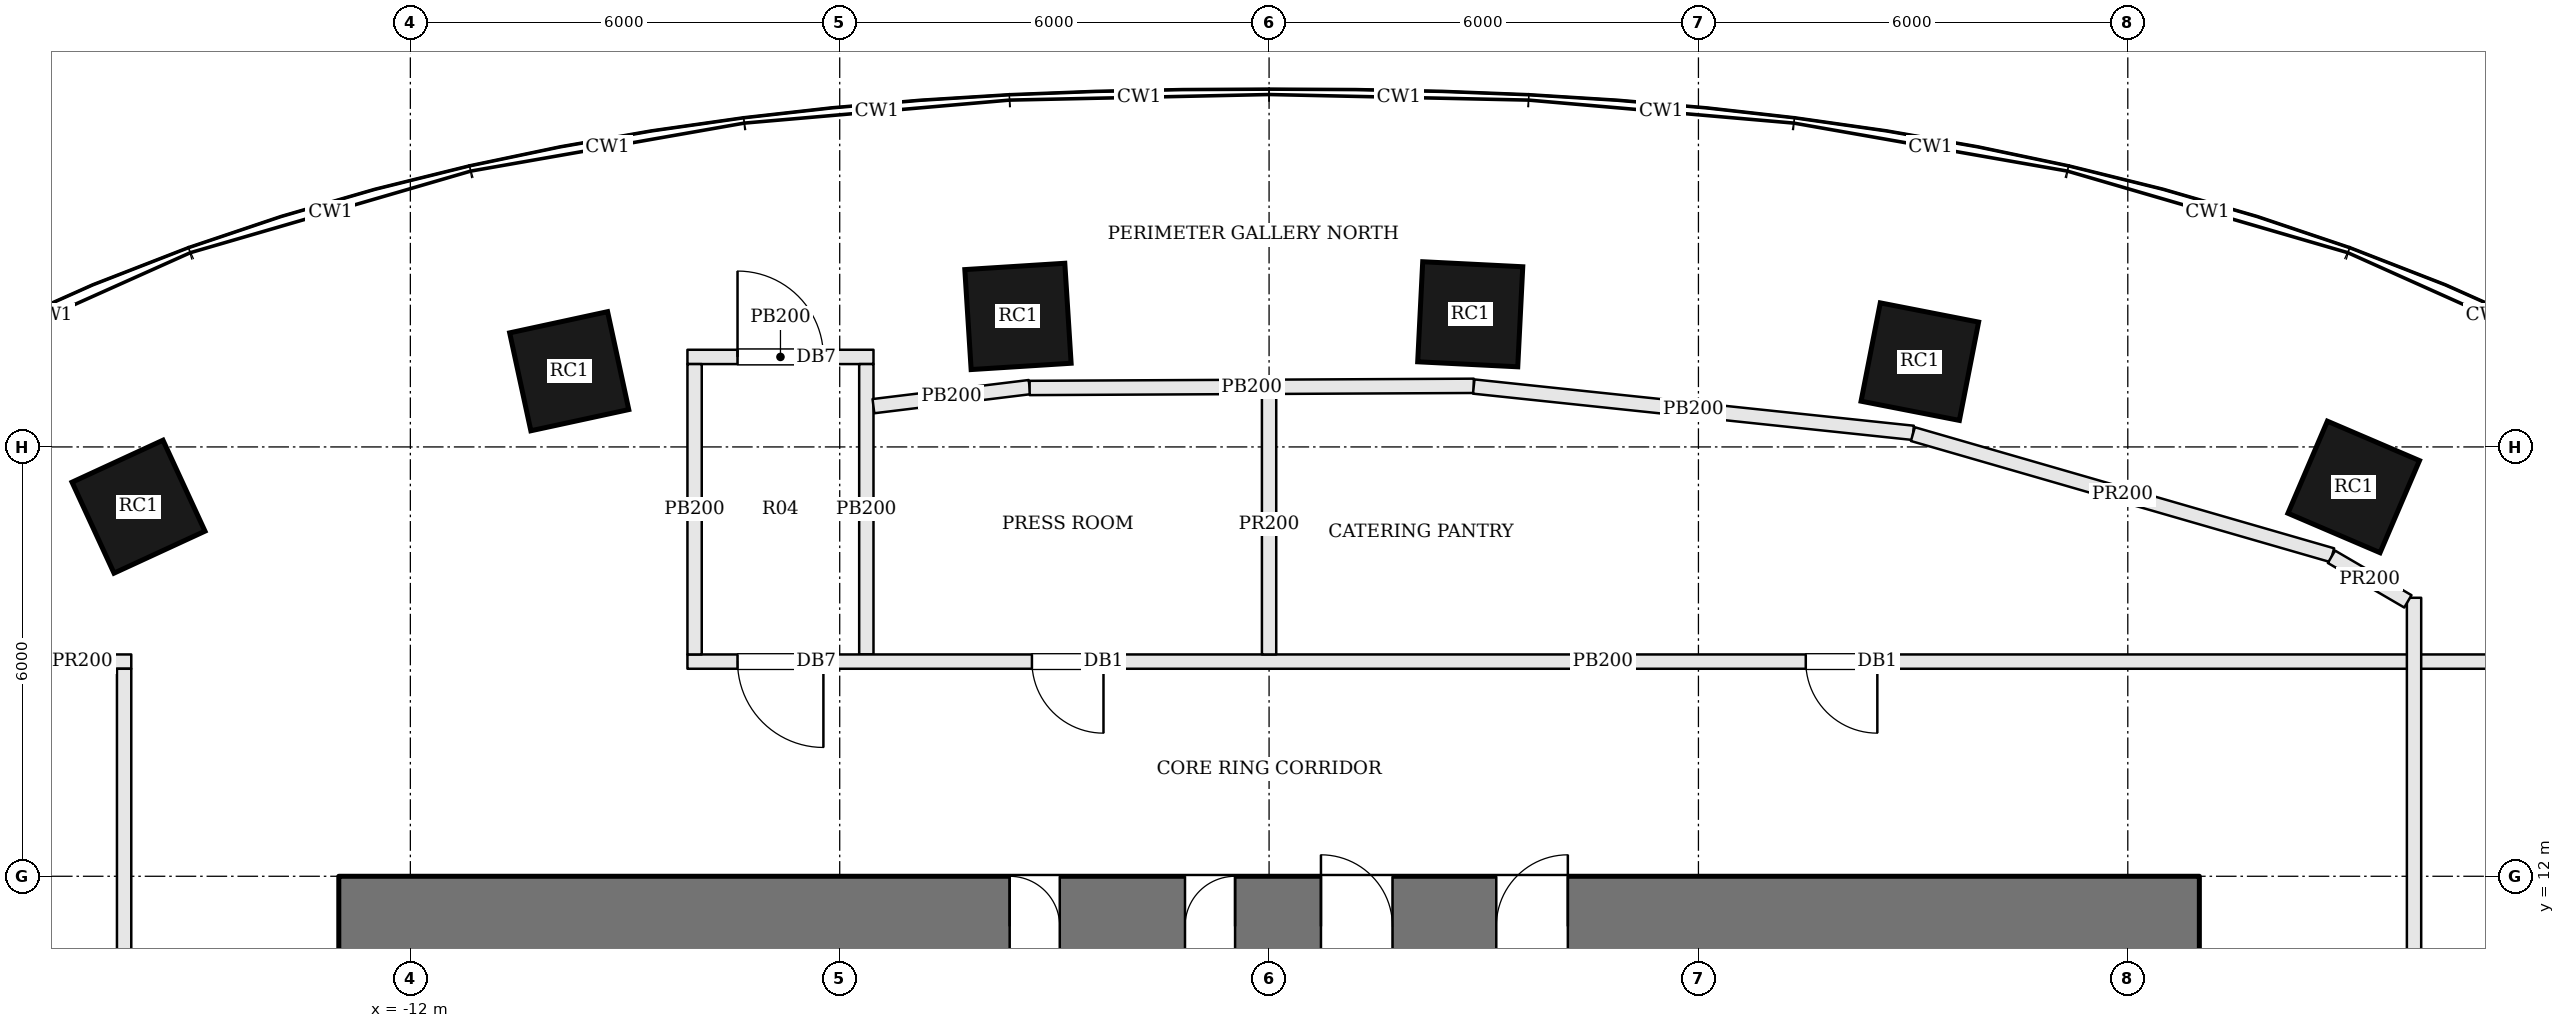
"""IFC4 building model, lengths in metres.
Left out: names, types, materials, properties, quantities, classifications, styles, units other than length and angle.
Written with IfcOpenShell. Run it as: python <this file> out.ifc"""

import sys

from ifc_helpers import new_model, si_unit, direction, frame, frame_2d, origin, origin_2d, place, context, subcontext, project, spatial, rectangle, extrude, element, fill, save


model = new_model("IFC4")
c1 = context("Model", 3, precision=1e-05, world=origin(), true_north=direction((0.0, 1.0)))
c2 = subcontext(c1, "Body", "Model", "MODEL_VIEW")
j1 = project(units=[si_unit("LENGTHUNIT", "METRE"), si_unit("PLANEANGLEUNIT", "RADIAN")], contexts=[c1])
p1 = place(None, origin())
s1 = spatial("IfcSite", under=j1, at=p1, CompositionType="ELEMENT")
p2 = place(p1, origin())
s2 = spatial("IfcBuilding", under=s1, at=p2, CompositionType="ELEMENT")
p3 = place(p2, frame((0.0, 0.0, 7.2)))
s3 = spatial("IfcBuildingStorey", under=s2, at=p3, CompositionType="ELEMENT", Elevation=7.2)
p4 = place(p3, frame((-13.0, 11.3, 0.0), z_axis=(0.0, 0.0, 1.0), x_axis=(1.0, 0.0, 0.0)))
e1 = element("IfcWall", 1, at=p4, inside=s3, PredefinedType="SHEAR", context=c2, shape_type="SweptSolid", body=[
    extrude(rectangle(XDim=26.0, YDim=1.4, at=frame_2d((13.0, 0.0))), origin(), (0.0, 0.0, 1.0), 7.8),
])
p5 = place(p4, frame((9.375, 0.0, 0.0)))
e2 = element("IfcOpeningElement", 2, at=p5, cuts=e1, PredefinedType="OPENING", context=c2, shape_type="SweptSolid", body=[
    extrude(rectangle(XDim=0.7, YDim=2.1, at=frame_2d((0.35, 1.05))), frame((0.0, 0.71, 0.0), z_axis=(0.0, -1.0, 0.0), x_axis=(1.0, 0.0, 0.0)), (0.0, 0.0, 1.0), 1.42),
])
p6 = place(p4, frame((11.825, 0.0, 0.0)))
e3 = element("IfcOpeningElement", 3, at=p6, cuts=e1, PredefinedType="OPENING", context=c2, shape_type="SweptSolid", body=[
    extrude(rectangle(XDim=0.7, YDim=2.1, at=frame_2d((0.35, 1.05))), frame((0.0, 0.71, 0.0), z_axis=(0.0, -1.0, 0.0), x_axis=(1.0, 0.0, 0.0)), (0.0, 0.0, 1.0), 1.42),
])
p7 = place(p4, frame((13.725, 0.0, 0.0)))
e4 = element("IfcOpeningElement", 4, at=p7, cuts=e1, PredefinedType="OPENING", context=c2, shape_type="SweptSolid", body=[
    extrude(rectangle(XDim=1.0, YDim=2.1, at=frame_2d((0.5, 1.05))), frame((0.0, 0.71, 0.0), z_axis=(0.0, -1.0, 0.0), x_axis=(1.0, 0.0, 0.0)), (0.0, 0.0, 1.0), 1.42),
])
p8 = place(p4, frame((16.175, 0.0, 0.0)))
e5 = element("IfcOpeningElement", 5, at=p8, cuts=e1, PredefinedType="OPENING", context=c2, shape_type="SweptSolid", body=[
    extrude(rectangle(XDim=1.0, YDim=2.1, at=frame_2d((0.5, 1.05))), frame((0.0, 0.71, 0.0), z_axis=(0.0, -1.0, 0.0), x_axis=(1.0, 0.0, 0.0)), (0.0, 0.0, 1.0), 1.42),
])
for number, where, z_axis, x_axis in (
    (6, (15.157, 17.441, 0.0), (0.0, 0.0, 1.0), (-0.919, 0.394, 0.0)),
    (7, (9.094, 19.192, 0.0), (0.0, 0.0, 1.0), (-0.981, 0.192, 0.0)),
    (8, (2.811, 19.854, 0.0), (0.0, 0.0, 1.0), (-0.999, 0.05, 0.0)),
    (9, (-3.509, 19.824, 0.0), (0.0, 0.0, 1.0), (-0.998, -0.063, 0.0)),
    (10, (-9.78, 19.058, 0.0), (0.0, 0.0, 1.0), (-0.977, -0.211, 0.0)),
    (11, (-15.799, 17.165, 0.0), (0.0, 0.0, 1.0), (-0.908, -0.419, 0.0)),
):
    element("IfcColumn", number, at=place(p3, frame(where, z_axis=z_axis, x_axis=x_axis)), inside=s3, PredefinedType="COLUMN", context=c2, shape_type="SweptSolid", body=[
        extrude(rectangle(XDim=1.4, YDim=1.4, at=origin_2d()), origin(), (0.0, 0.0, 1.0), 7.8),
    ])
p9 = place(p3, frame((-8.128, 19.258, 0.0), z_axis=(0.0, 0.0, 1.0), x_axis=(1.0, 0.0, 0.0)))
e12 = element("IfcWall", 12, at=p9, inside=s3, PredefinedType="PARTITIONING", context=c2, shape_type="SweptSolid", body=[
    extrude(rectangle(XDim=2.6, YDim=0.2, at=frame_2d((1.3, 0.0))), origin(), (0.0, 0.0, 1.0), 6.83),
])
p10 = place(p9, frame((0.7, 0.0, 0.0)))
e13 = element("IfcOpeningElement", 13, at=p10, cuts=e12, PredefinedType="OPENING", context=c2, shape_type="SweptSolid", body=[
    extrude(rectangle(XDim=1.2, YDim=2.1, at=frame_2d((0.6, 1.05))), frame((0.0, 0.11, 0.0), z_axis=(0.0, -1.0, 0.0), x_axis=(1.0, 0.0, 0.0)), (0.0, 0.0, 1.0), 0.22),
])
p11 = place(p3, frame((-5.628, 19.158, 0.0), z_axis=(0.0, 0.0, 1.0), x_axis=(0.0, -1.0, 0.0)))
e14 = element("IfcWall", 14, at=p11, inside=s3, PredefinedType="PARTITIONING", context=c2, shape_type="SweptSolid", body=[
    extrude(rectangle(XDim=4.058, YDim=0.2, at=frame_2d((2.029, 0.0))), origin(), (0.0, 0.0, 1.0), 6.83),
])
p12 = place(p3, frame((17.457, 15.0, 0.0), z_axis=(0.0, 0.0, 1.0), x_axis=(-1.0, 0.0, 0.0)))
e15 = element("IfcWall", 15, at=p12, inside=s3, PredefinedType="PARTITIONING", context=c2, shape_type="SweptSolid", body=[
    extrude(rectangle(XDim=25.585, YDim=0.2, at=frame_2d((12.792, 0.0))), origin(), (0.0, 0.0, 1.0), 6.83),
])
p13 = place(p12, frame((23.685, 0.0, 0.0)))
e16 = element("IfcOpeningElement", 16, at=p13, cuts=e15, PredefinedType="OPENING", context=c2, shape_type="SweptSolid", body=[
    extrude(rectangle(XDim=1.2, YDim=2.1, at=frame_2d((0.6, 1.05))), frame((0.0, 0.11, 0.0), z_axis=(0.0, -1.0, 0.0), x_axis=(1.0, 0.0, 0.0)), (0.0, 0.0, 1.0), 0.22),
])
p14 = place(p12, frame((19.771, 0.0, 0.0)))
e17 = element("IfcOpeningElement", 17, at=p14, cuts=e15, PredefinedType="OPENING", context=c2, shape_type="SweptSolid", body=[
    extrude(rectangle(XDim=1.0, YDim=2.1, at=frame_2d((0.5, 1.05))), frame((0.0, 0.11, 0.0), z_axis=(0.0, -1.0, 0.0), x_axis=(1.0, 0.0, 0.0)), (0.0, 0.0, 1.0), 0.22),
])
p15 = place(p12, frame((8.957, 0.0, 0.0)))
e18 = element("IfcOpeningElement", 18, at=p15, cuts=e15, PredefinedType="OPENING", context=c2, shape_type="SweptSolid", body=[
    extrude(rectangle(XDim=1.0, YDim=2.1, at=frame_2d((0.5, 1.05))), frame((0.0, 0.11, 0.0), z_axis=(0.0, -1.0, 0.0), x_axis=(1.0, 0.0, 0.0)), (0.0, 0.0, 1.0), 0.22),
])
p16 = place(p3, frame((-8.028, 15.1, 0.0), z_axis=(0.0, 0.0, 1.0), x_axis=(0.0, 1.0, 0.0)))
e19 = element("IfcWall", 19, at=p16, inside=s3, PredefinedType="PARTITIONING", context=c2, shape_type="SweptSolid", body=[
    extrude(rectangle(XDim=4.058, YDim=0.2, at=frame_2d((2.029, 0.0))), origin(), (0.0, 0.0, 1.0), 6.83),
])
p17 = place(p3, frame((-17.268, 15.0, 0.0), z_axis=(0.0, 0.0, 1.0), x_axis=(1.0, 0.0, 0.0)))
e20 = element("IfcWall", 20, at=p17, inside=s3, PredefinedType="PARTITIONING", context=c2, shape_type="SweptSolid", body=[
    extrude(rectangle(XDim=1.368, YDim=0.2, at=frame_2d((0.684, 0.0))), origin(), (0.0, 0.0, 1.0), 6.934),
])
p18 = place(p3, frame((-16.0, 14.9, 0.0), z_axis=(0.0, 0.0, 1.0), x_axis=(0.0, -1.0, 0.0)))
e21 = element("IfcWall", 21, at=p18, inside=s3, PredefinedType="PARTITIONING", context=c2, shape_type="SweptSolid", body=[
    extrude(rectangle(XDim=20.8, YDim=0.2, at=frame_2d((10.4, 0.0))), origin(), (0.0, 0.0, 1.0), 6.83),
])
p19 = place(p18, frame((9.9, 0.0, 0.0)))
e22 = element("IfcOpeningElement", 22, at=p19, cuts=e21, PredefinedType="OPENING", context=c2, shape_type="SweptSolid", body=[
    extrude(rectangle(XDim=1.0, YDim=2.1, at=frame_2d((0.5, 1.05))), frame((0.0, 0.11, 0.0), z_axis=(0.0, -1.0, 0.0), x_axis=(1.0, 0.0, 0.0)), (0.0, 0.0, 1.0), 0.22),
])
p20 = place(p3, frame((16.0, -5.9, 0.0), z_axis=(0.0, 0.0, 1.0), x_axis=(0.0, 1.0, 0.0)))
e23 = element("IfcWall", 23, at=p20, inside=s3, PredefinedType="PARTITIONING", context=c2, shape_type="SweptSolid", body=[
    extrude(rectangle(XDim=21.792, YDim=0.2, at=frame_2d((10.896, 0.0))), origin(), (0.0, 0.0, 1.0), 6.83),
])
p21 = place(p20, frame((9.9, 0.0, 0.0)))
e24 = element("IfcOpeningElement", 24, at=p21, cuts=e23, PredefinedType="OPENING", context=c2, shape_type="SweptSolid", body=[
    extrude(rectangle(XDim=1.0, YDim=2.1, at=frame_2d((0.5, 1.05))), frame((0.0, 0.11, 0.0), z_axis=(0.0, -1.0, 0.0), x_axis=(1.0, 0.0, 0.0)), (0.0, 0.0, 1.0), 0.22),
])
p22 = place(p3, frame((-5.529, 18.57, 0.0), z_axis=(0.0, 0.0, 1.0), x_axis=(0.992659217013, 0.120944941522, 0.0)))
e25 = element("IfcWall", 25, at=p22, inside=s3, PredefinedType="PARTITIONING", context=c2, shape_type="SweptSolid", body=[
    extrude(rectangle(XDim=2.198, YDim=0.2, at=frame_2d((1.099, 0.0))), origin(), (0.0, 0.0, 1.0), 6.83),
])
p23 = place(p3, frame((-3.346, 18.824, 0.0), z_axis=(0.0, 0.0, 1.0), x_axis=(0.999988297333, 0.004837891778, 0.0)))
e26 = element("IfcWall", 26, at=p23, inside=s3, PredefinedType="PARTITIONING", context=c2, shape_type="SweptSolid", body=[
    extrude(rectangle(XDim=6.207, YDim=0.2, at=frame_2d((3.104, 0.0))), origin(), (0.0, 0.0, 1.0), 6.83),
])
p24 = place(p3, frame((0.0, 18.741, 0.0), z_axis=(0.0, 0.0, 1.0), x_axis=(0.0, -1.0, 0.0)))
e27 = element("IfcWall", 27, at=p24, inside=s3, PredefinedType="PARTITIONING", context=c2, shape_type="SweptSolid", body=[
    extrude(rectangle(XDim=3.641, YDim=0.2, at=frame_2d((1.82, 0.0))), origin(), (0.0, 0.0, 1.0), 6.934),
])
p25 = place(p3, frame((2.86, 18.844, 0.0), z_axis=(0.0, 0.0, 1.0), x_axis=(0.994494179805, -0.10479182379, 0.0)))
e28 = element("IfcWall", 28, at=p25, inside=s3, PredefinedType="PARTITIONING", context=c2, shape_type="SweptSolid", body=[
    extrude(rectangle(XDim=6.174, YDim=0.2, at=frame_2d((3.087, 0.0))), origin(), (0.0, 0.0, 1.0), 6.83),
])
p26 = place(p3, frame((8.997, 18.179, 0.0), z_axis=(0.0, 0.0, 1.0), x_axis=(0.960743591904, -0.277437831982, 0.0)))
e29 = element("IfcWall", 29, at=p26, inside=s3, PredefinedType="PARTITIONING", context=c2, shape_type="SweptSolid", body=[
    extrude(rectangle(XDim=6.098, YDim=0.2, at=frame_2d((3.049, 0.0))), origin(), (0.0, 0.0, 1.0), 6.934),
])
p27 = place(p3, frame((14.846, 16.465, 0.0), z_axis=(0.0, 0.0, 1.0), x_axis=(0.863786061732, -0.503858749609, 0.0)))
e30 = element("IfcWall", 30, at=p27, inside=s3, PredefinedType="PARTITIONING", context=c2, shape_type="SweptSolid", body=[
    extrude(rectangle(XDim=1.237, YDim=0.2, at=frame_2d((0.618, 0.0))), origin(), (0.0, 0.0, 1.0), 6.934),
])
p28 = place(p5, origin())
e31 = element("IfcDoor", 31, at=p28, inside=s3, OperationType="SINGLE_SWING_LEFT", PredefinedType="DOOR", context=c2, shape_type="SweptSolid", body=[
    extrude(rectangle(XDim=0.7, YDim=2.1, at=frame_2d((0.35, 1.05))), frame((0.0, 0.025, 0.0), z_axis=(0.0, -1.0, 0.0), x_axis=(1.0, 0.0, 0.0)), (0.0, 0.0, 1.0), 0.05),
])
fill(e2, e31)
p29 = place(p6, origin())
e32 = element("IfcDoor", 32, at=p29, inside=s3, OperationType="SINGLE_SWING_RIGHT", PredefinedType="DOOR", context=c2, shape_type="SweptSolid", body=[
    extrude(rectangle(XDim=0.7, YDim=2.1, at=frame_2d((0.35, 1.05))), frame((0.0, 0.025, 0.0), z_axis=(0.0, -1.0, 0.0), x_axis=(1.0, 0.0, 0.0)), (0.0, 0.0, 1.0), 0.05),
])
fill(e3, e32)
p30 = place(p7, origin())
e33 = element("IfcDoor", 33, at=p30, inside=s3, OperationType="SINGLE_SWING_LEFT", PredefinedType="DOOR", context=c2, shape_type="SweptSolid", body=[
    extrude(rectangle(XDim=1.0, YDim=2.1, at=frame_2d((0.5, 1.05))), frame((0.0, 0.025, 0.0), z_axis=(0.0, -1.0, 0.0), x_axis=(1.0, 0.0, 0.0)), (0.0, 0.0, 1.0), 0.05),
])
fill(e4, e33)
p31 = place(p8, origin())
e34 = element("IfcDoor", 34, at=p31, inside=s3, OperationType="SINGLE_SWING_RIGHT", PredefinedType="DOOR", context=c2, shape_type="SweptSolid", body=[
    extrude(rectangle(XDim=1.0, YDim=2.1, at=frame_2d((0.5, 1.05))), frame((0.0, 0.025, 0.0), z_axis=(0.0, -1.0, 0.0), x_axis=(1.0, 0.0, 0.0)), (0.0, 0.0, 1.0), 0.05),
])
fill(e5, e34)
p32 = place(p13, origin())
e35 = element("IfcDoor", 35, at=p32, inside=s3, OperationType="SINGLE_SWING_LEFT", PredefinedType="DOOR", context=c2, shape_type="SweptSolid", body=[
    extrude(rectangle(XDim=1.2, YDim=2.1, at=frame_2d((0.6, 1.05))), frame((0.0, 0.025, 0.0), z_axis=(0.0, -1.0, 0.0), x_axis=(1.0, 0.0, 0.0)), (0.0, 0.0, 1.0), 0.05),
])
fill(e16, e35)
p33 = place(p10, origin())
e36 = element("IfcDoor", 36, at=p33, inside=s3, OperationType="SINGLE_SWING_LEFT", PredefinedType="DOOR", context=c2, shape_type="SweptSolid", body=[
    extrude(rectangle(XDim=1.2, YDim=2.1, at=frame_2d((0.6, 1.05))), frame((0.0, 0.025, 0.0), z_axis=(0.0, -1.0, 0.0), x_axis=(1.0, 0.0, 0.0)), (0.0, 0.0, 1.0), 0.05),
])
fill(e13, e36)
p34 = place(p14, origin())
e37 = element("IfcDoor", 37, at=p34, inside=s3, OperationType="SINGLE_SWING_LEFT", PredefinedType="DOOR", context=c2, shape_type="SweptSolid", body=[
    extrude(rectangle(XDim=1.0, YDim=2.1, at=frame_2d((0.5, 1.05))), frame((0.0, 0.025, 0.0), z_axis=(0.0, -1.0, 0.0), x_axis=(1.0, 0.0, 0.0)), (0.0, 0.0, 1.0), 0.05),
])
fill(e17, e37)
p35 = place(p15, origin())
e38 = element("IfcDoor", 38, at=p35, inside=s3, OperationType="SINGLE_SWING_LEFT", PredefinedType="DOOR", context=c2, shape_type="SweptSolid", body=[
    extrude(rectangle(XDim=1.0, YDim=2.1, at=frame_2d((0.5, 1.05))), frame((0.0, 0.025, 0.0), z_axis=(0.0, -1.0, 0.0), x_axis=(1.0, 0.0, 0.0)), (0.0, 0.0, 1.0), 0.05),
])
fill(e18, e38)
save(model, sys.argv[1])
